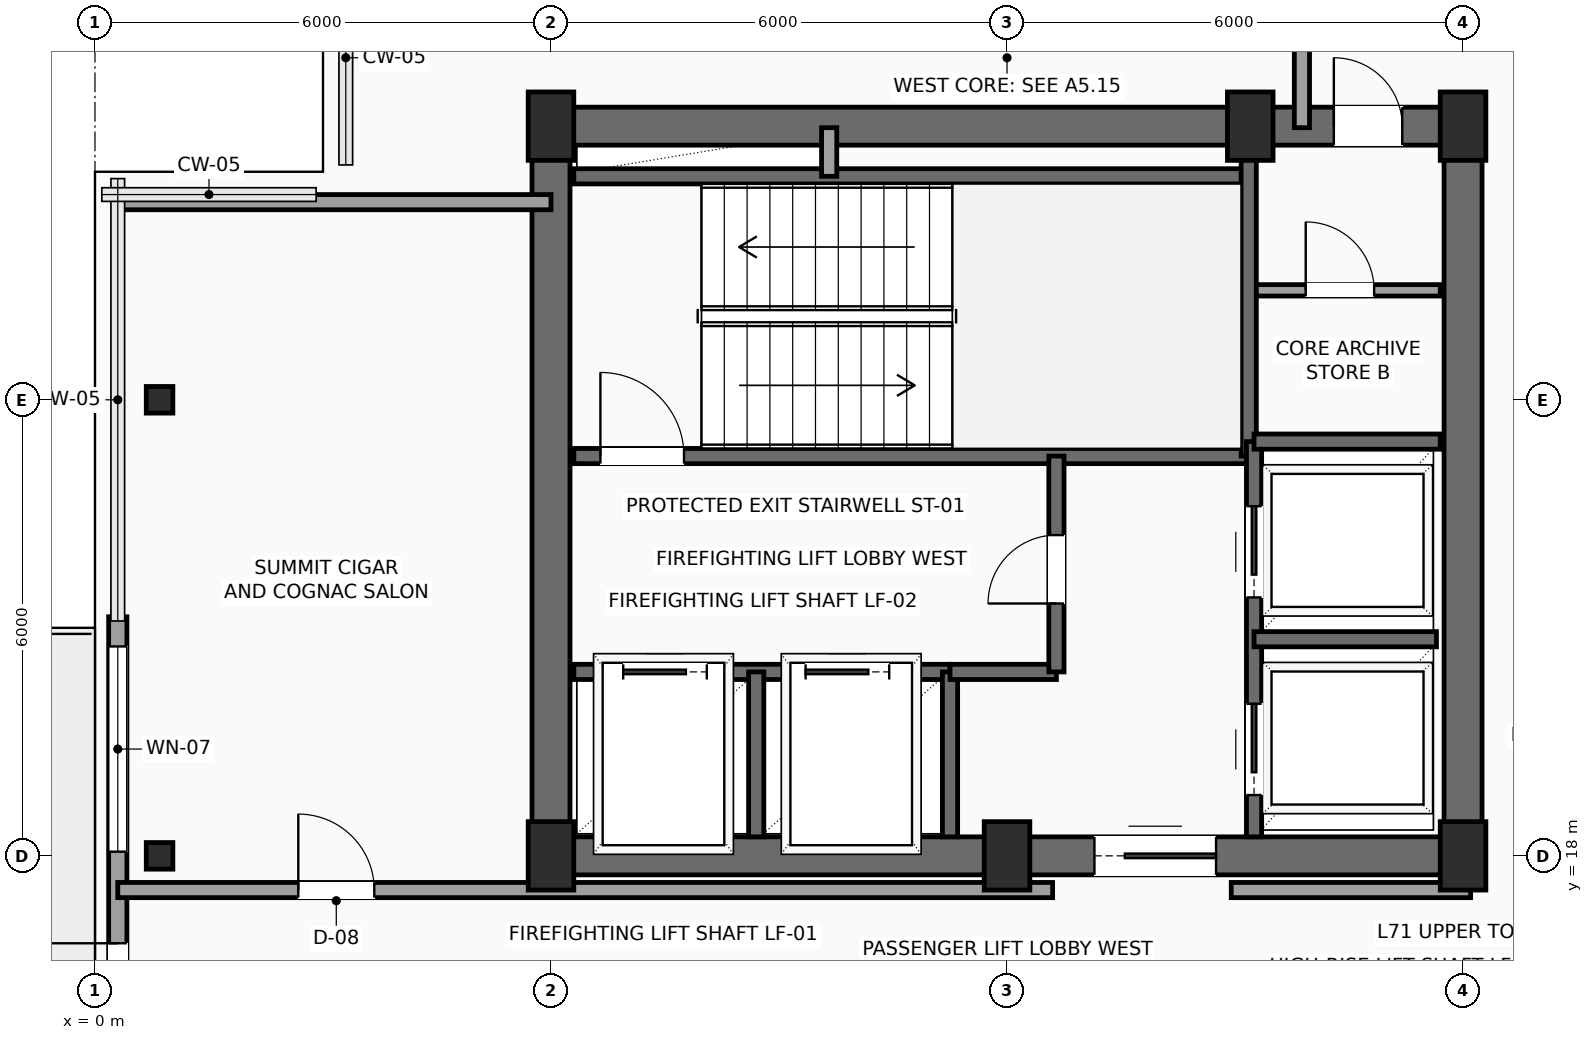
"""IFC4 building model, lengths in metres.
Left out: names, types, materials, properties, quantities, classifications, styles, units other than length and angle.
Written with IfcOpenShell. Run it as: python <this file> out.ifc"""

import sys

from ifc_helpers import new_model, si_unit, direction, frame, frame_2d, origin, origin_2d, place, context, subcontext, project, spatial, rectangle, hollow_rectangle, extrude, element, fill, save


model = new_model("IFC4")
c1 = context("Model", 3, precision=1e-05, world=origin(), true_north=direction((0.0, 1.0)))
c2 = subcontext(c1, "Body", "Model", "MODEL_VIEW")
j1 = project(units=[si_unit("LENGTHUNIT", "METRE"), si_unit("PLANEANGLEUNIT", "RADIAN")], contexts=[c1])
p1 = place(None, origin())
s1 = spatial("IfcSite", under=j1, at=p1, CompositionType="ELEMENT")
p2 = place(p1, origin())
s2 = spatial("IfcBuilding", under=s1, at=p2, CompositionType="ELEMENT")
p3 = place(p2, frame((0.0, 0.0, 281.7)))
s3 = spatial("IfcBuildingStorey", under=s2, at=p3, CompositionType="ELEMENT", Elevation=281.7)
for number, where, z_axis, x_axis in (
    (1, (6.0, 18.0, 0.0), (0.0, 0.0, 1.0), (1.0, 0.0, 0.0)),
    (2, (12.0, 18.0, 0.0), (0.0, 0.0, 1.0), (1.0, 0.0, 0.0)),
    (3, (18.0, 18.0, 0.0), (0.0, 0.0, 1.0), (1.0, 0.0, 0.0)),
    (4, (6.0, 27.6, 0.0), (0.0, 0.0, 1.0), (1.0, 0.0, 0.0)),
    (5, (15.2, 27.6, 0.0), (0.0, 0.0, 1.0), (1.0, 0.0, 0.0)),
    (6, (18.0, 27.6, 0.0), (0.0, 0.0, 1.0), (1.0, 0.0, 0.0)),
):
    element("IfcColumn", number, at=place(p3, frame(where, z_axis=z_axis, x_axis=x_axis)), inside=s3, PredefinedType="COLUMN", context=c2, shape_type="SweptSolid", body=[
        extrude(rectangle(XDim=0.6, YDim=0.9, at=origin_2d()), origin(), (0.0, 0.0, 1.0), 3.5),
    ])
for number, where, z_axis, x_axis in (
    (7, (0.85, 18.0, 0.0), (0.0, 0.0, 1.0), (1.0, 0.0, 0.0)),
    (8, (0.85, 24.0, 0.0), (0.0, 0.0, 1.0), (1.0, 0.0, 0.0)),
):
    element("IfcColumn", number, at=place(p3, frame(where, z_axis=z_axis, x_axis=x_axis)), inside=s3, PredefinedType="COLUMN", context=c2, shape_type="SweptSolid", body=[
        extrude(hollow_rectangle(XDim=0.35, YDim=0.35, WallThickness=0.016, InnerFilletRadius=0.016, OuterFilletRadius=0.032, at=origin_2d()), origin(), (0.0, 0.0, 1.0), 3.5),
    ])
p4 = place(p3, frame((0.3, 11.855, 0.0), z_axis=(0.0, 0.0, 1.0), x_axis=(0.0, 1.0, 0.0)))
e9 = element("IfcWall", 9, at=p4, inside=s3, PredefinedType="SOLIDWALL", context=c2, shape_type="SweptSolid", body=[
    extrude(rectangle(XDim=9.29, YDim=0.24, at=frame_2d((4.645, 0.0))), origin(), (0.0, 0.0, 1.0), 3.3),
])
p5 = place(p4, frame((3.945, 0.0, 0.0)))
e10 = element("IfcOpeningElement", 10, at=p5, cuts=e9, PredefinedType="OPENING", context=c2, shape_type="SweptSolid", body=[
    extrude(rectangle(XDim=1.05, YDim=2.2, at=frame_2d((0.525, 1.1))), frame((0.0, 0.13, 0.0), z_axis=(0.0, -1.0, 0.0), x_axis=(1.0, 0.0, 0.0)), (0.0, 0.0, 1.0), 0.26),
])
p6 = place(p4, frame((6.2, 0.0, 0.6)))
e11 = element("IfcOpeningElement", 11, at=p6, cuts=e9, PredefinedType="OPENING", context=c2, shape_type="SweptSolid", body=[
    extrude(rectangle(XDim=2.7, YDim=2.3, at=frame_2d((1.35, 1.15))), frame((0.0, 0.13, 0.0), z_axis=(0.0, -1.0, 0.0), x_axis=(1.0, 0.0, 0.0)), (0.0, 0.0, 1.0), 0.26),
])
p7 = place(p4, frame((0.8, 0.0, 0.6)))
e12 = element("IfcOpeningElement", 12, at=p7, cuts=e9, PredefinedType="OPENING", context=c2, shape_type="SweptSolid", body=[
    extrude(rectangle(XDim=0.9, YDim=2.2, at=frame_2d((0.45, 1.1))), frame((0.0, 0.13, 0.0), z_axis=(0.0, -1.0, 0.0), x_axis=(1.0, 0.0, 0.0)), (0.0, 0.0, 1.0), 0.26),
])
p8 = place(p3, frame((6.0, 18.0, 0.0), z_axis=(0.0, 0.0, 1.0), x_axis=(1.0, 0.0, 0.0)))
e13 = element("IfcWall", 13, at=p8, inside=s3, PredefinedType="SHEAR", context=c2, shape_type="SweptSolid", body=[
    extrude(rectangle(XDim=12.0, YDim=0.5, at=frame_2d((6.0, 0.0))), origin(), (0.0, 0.0, 1.0), 3.3),
])
p9 = place(p8, frame((7.15, 0.0, 0.0)))
e14 = element("IfcOpeningElement", 14, at=p9, cuts=e13, PredefinedType="OPENING", context=c2, shape_type="SweptSolid", body=[
    extrude(rectangle(XDim=1.6, YDim=2.3, at=frame_2d((0.8, 1.15))), frame((0.0, 0.26, 0.0), z_axis=(0.0, -1.0, 0.0), x_axis=(1.0, 0.0, 0.0)), (0.0, 0.0, 1.0), 0.52),
])
p10 = place(p3, frame((6.0, 27.6, 0.0), z_axis=(0.0, 0.0, 1.0), x_axis=(1.0, 0.0, 0.0)))
e15 = element("IfcWall", 15, at=p10, inside=s3, PredefinedType="SHEAR", context=c2, shape_type="SweptSolid", body=[
    extrude(rectangle(XDim=12.0, YDim=0.5, at=frame_2d((6.0, 0.0))), origin(), (0.0, 0.0, 1.0), 3.3),
])
p11 = place(p10, frame((10.3, 0.0, 0.0)))
e16 = element("IfcOpeningElement", 16, at=p11, cuts=e15, PredefinedType="OPENING", context=c2, shape_type="SweptSolid", body=[
    extrude(rectangle(XDim=0.9, YDim=2.15, at=frame_2d((0.45, 1.075))), frame((0.0, 0.26, 0.0), z_axis=(0.0, -1.0, 0.0), x_axis=(1.0, 0.0, 0.0)), (0.0, 0.0, 1.0), 0.52),
])
for number, where, z_axis, x_axis in (
    (17, (6.0, 18.0, 0.0), (0.0, 0.0, 1.0), (0.0, 1.0, 0.0)),
    (18, (18.0, 18.0, 0.0), (0.0, 0.0, 1.0), (0.0, 1.0, 0.0)),
):
    element("IfcWall", number, at=place(p3, frame(where, z_axis=z_axis, x_axis=x_axis)), inside=s3, PredefinedType="SHEAR", context=c2, shape_type="SweptSolid", body=[
        extrude(rectangle(XDim=9.6, YDim=0.5, at=frame_2d((4.8, 0.0))), origin(), (0.0, 0.0, 1.0), 3.3),
    ])
p12 = place(p3, frame((6.3, 23.26, 0.0), z_axis=(0.0, 0.0, 1.0), x_axis=(1.0, 0.0, 0.0)))
e19 = element("IfcWall", 19, at=p12, inside=s3, PredefinedType="SHEAR", context=c2, shape_type="SweptSolid", body=[
    extrude(rectangle(XDim=8.88, YDim=0.2, at=frame_2d((4.44, 0.0))), origin(), (0.0, 0.0, 1.0), 3.3),
])
p13 = place(p12, frame((0.35, 0.0, 0.0)))
e20 = element("IfcOpeningElement", 20, at=p13, cuts=e19, PredefinedType="OPENING", context=c2, shape_type="SweptSolid", body=[
    extrude(rectangle(XDim=1.1, YDim=2.2, at=frame_2d((0.55, 1.1))), frame((0.0, 0.11, 0.0), z_axis=(0.0, -1.0, 0.0), x_axis=(1.0, 0.0, 0.0)), (0.0, 0.0, 1.0), 0.22),
])
p14 = place(p3, frame((6.3, 26.94, 0.0), z_axis=(0.0, 0.0, 1.0), x_axis=(1.0, 0.0, 0.0)))
e21 = element("IfcWall", 21, at=p14, inside=s3, PredefinedType="SHEAR", context=c2, shape_type="SweptSolid", body=[
    extrude(rectangle(XDim=8.88, YDim=0.2, at=frame_2d((4.44, 0.0))), origin(), (0.0, 0.0, 1.0), 3.3),
])
p15 = place(p3, frame((15.18, 23.26, 0.0), z_axis=(0.0, 0.0, 1.0), x_axis=(0.0, 1.0, 0.0)))
e22 = element("IfcWall", 22, at=p15, inside=s3, PredefinedType="SHEAR", context=c2, shape_type="SweptSolid", body=[
    extrude(rectangle(XDim=4.04, YDim=0.2, at=frame_2d((2.02, 0.0))), origin(), (0.0, 0.0, 1.0), 3.3),
])
p16 = place(p3, frame((6.3, 20.42, 0.0), z_axis=(0.0, 0.0, 1.0), x_axis=(1.0, 0.0, 0.0)))
e23 = element("IfcWall", 23, at=p16, inside=s3, PredefinedType="SHEAR", context=c2, shape_type="SweptSolid", body=[
    extrude(rectangle(XDim=4.95, YDim=0.2, at=frame_2d((2.475, 0.0))), origin(), (0.0, 0.0, 1.0), 3.3),
])
p17 = place(p16, frame((0.65, 0.0, 0.0)))
e24 = element("IfcOpeningElement", 24, at=p17, cuts=e23, PredefinedType="OPENING", context=c2, shape_type="SweptSolid", body=[
    extrude(rectangle(XDim=1.1, YDim=2.2, at=frame_2d((0.55, 1.1))), frame((0.0, 0.11, 0.0), z_axis=(0.0, -1.0, 0.0), x_axis=(1.0, 0.0, 0.0)), (0.0, 0.0, 1.0), 0.22),
])
p18 = place(p16, frame((3.05, 0.0, 0.0)))
e25 = element("IfcOpeningElement", 25, at=p18, cuts=e23, PredefinedType="OPENING", context=c2, shape_type="SweptSolid", body=[
    extrude(rectangle(XDim=1.1, YDim=2.2, at=frame_2d((0.55, 1.1))), frame((0.0, 0.11, 0.0), z_axis=(0.0, -1.0, 0.0), x_axis=(1.0, 0.0, 0.0)), (0.0, 0.0, 1.0), 0.22),
])
for number, where, z_axis, x_axis in (
    (26, (8.7, 18.25, 0.0), (0.0, 0.0, 1.0), (0.0, 1.0, 0.0)),
    (27, (11.25, 18.25, 0.0), (0.0, 0.0, 1.0), (0.0, 1.0, 0.0)),
):
    element("IfcWall", number, at=place(p3, frame(where, z_axis=z_axis, x_axis=x_axis)), inside=s3, PredefinedType="SHEAR", context=c2, shape_type="SweptSolid", body=[
        extrude(rectangle(XDim=2.17, YDim=0.2, at=frame_2d((1.085, 0.0))), origin(), (0.0, 0.0, 1.0), 3.3),
    ])
p19 = place(p3, frame((11.25, 20.42, 0.0), z_axis=(0.0, 0.0, 1.0), x_axis=(1.0, 0.0, 0.0)))
e28 = element("IfcWall", 28, at=p19, inside=s3, PredefinedType="SHEAR", context=c2, shape_type="SweptSolid", body=[
    extrude(rectangle(XDim=1.4, YDim=0.2, at=frame_2d((0.7, 0.0))), origin(), (0.0, 0.0, 1.0), 3.3),
])
p20 = place(p3, frame((12.65, 20.42, 0.0), z_axis=(0.0, 0.0, 1.0), x_axis=(0.0, 1.0, 0.0)))
e29 = element("IfcWall", 29, at=p20, inside=s3, PredefinedType="SHEAR", context=c2, shape_type="SweptSolid", body=[
    extrude(rectangle(XDim=2.84, YDim=0.2, at=frame_2d((1.42, 0.0))), origin(), (0.0, 0.0, 1.0), 3.3),
])
p21 = place(p20, frame((0.9, 0.0, 0.0)))
e30 = element("IfcOpeningElement", 30, at=p21, cuts=e29, PredefinedType="OPENING", context=c2, shape_type="SweptSolid", body=[
    extrude(rectangle(XDim=0.9, YDim=2.15, at=frame_2d((0.45, 1.075))), frame((0.0, 0.11, 0.0), z_axis=(0.0, -1.0, 0.0), x_axis=(1.0, 0.0, 0.0)), (0.0, 0.0, 1.0), 0.22),
])
p22 = place(p3, frame((9.66, 26.94, 0.0), z_axis=(0.0, 0.0, 1.0), x_axis=(0.0, 1.0, 0.0)))
e31 = element("IfcWall", 31, at=p22, inside=s3, PredefinedType="SOLIDWALL", context=c2, shape_type="SweptSolid", body=[
    extrude(rectangle(XDim=0.64, YDim=0.2, at=frame_2d((0.32, 0.0))), origin(), (0.0, 0.0, 1.0), 3.3),
])
p23 = place(p3, frame((15.25, 18.25, 0.0), z_axis=(0.0, 0.0, 1.0), x_axis=(0.0, 1.0, 0.0)))
e32 = element("IfcWall", 32, at=p23, inside=s3, PredefinedType="SHEAR", context=c2, shape_type="SweptSolid", body=[
    extrude(rectangle(XDim=5.2, YDim=0.2, at=frame_2d((2.6, 0.0))), origin(), (0.0, 0.0, 1.0), 3.3),
])
p24 = place(p23, frame((0.55, 0.0, 0.0)))
e33 = element("IfcOpeningElement", 33, at=p24, cuts=e32, PredefinedType="OPENING", context=c2, shape_type="SweptSolid", body=[
    extrude(rectangle(XDim=1.2, YDim=2.2, at=frame_2d((0.6, 1.1))), frame((0.0, 0.11, 0.0), z_axis=(0.0, -1.0, 0.0), x_axis=(1.0, 0.0, 0.0)), (0.0, 0.0, 1.0), 0.22),
])
p25 = place(p23, frame((3.15, 0.0, 0.0)))
e34 = element("IfcOpeningElement", 34, at=p25, cuts=e32, PredefinedType="OPENING", context=c2, shape_type="SweptSolid", body=[
    extrude(rectangle(XDim=1.2, YDim=2.2, at=frame_2d((0.6, 1.1))), frame((0.0, 0.11, 0.0), z_axis=(0.0, -1.0, 0.0), x_axis=(1.0, 0.0, 0.0)), (0.0, 0.0, 1.0), 0.22),
])
p26 = place(p3, frame((15.25, 20.85, 0.0), z_axis=(0.0, 0.0, 1.0), x_axis=(1.0, 0.0, 0.0)))
e35 = element("IfcWall", 35, at=p26, inside=s3, PredefinedType="SHEAR", context=c2, shape_type="SweptSolid", body=[
    extrude(rectangle(XDim=2.4, YDim=0.2, at=frame_2d((1.2, 0.0))), origin(), (0.0, 0.0, 1.0), 3.3),
])
p27 = place(p3, frame((15.25, 23.45, 0.0), z_axis=(0.0, 0.0, 1.0), x_axis=(1.0, 0.0, 0.0)))
e36 = element("IfcWall", 36, at=p27, inside=s3, PredefinedType="SHEAR", context=c2, shape_type="SweptSolid", body=[
    extrude(rectangle(XDim=2.45, YDim=0.2, at=frame_2d((1.225, 0.0))), origin(), (0.0, 0.0, 1.0), 3.3),
])
p28 = place(p3, frame((15.28, 25.44, 0.0), z_axis=(0.0, 0.0, 1.0), x_axis=(1.0, 0.0, 0.0)))
e37 = element("IfcWall", 37, at=p28, inside=s3, PredefinedType="PARTITIONING", context=c2, shape_type="SweptSolid", body=[
    extrude(rectangle(XDim=2.42, YDim=0.15, at=frame_2d((1.21, 0.0))), origin(), (0.0, 0.0, 1.0), 3.3),
])
p29 = place(p28, frame((0.65, 0.0, 0.0)))
e38 = element("IfcOpeningElement", 38, at=p29, cuts=e37, PredefinedType="OPENING", context=c2, shape_type="SweptSolid", body=[
    extrude(rectangle(XDim=0.9, YDim=2.15, at=frame_2d((0.45, 1.075))), frame((0.0, 0.085, 0.0), z_axis=(0.0, -1.0, 0.0), x_axis=(1.0, 0.0, 0.0)), (0.0, 0.0, 1.0), 0.17),
])
p30 = place(p3, frame((0.3, 17.55, 0.0), z_axis=(0.0, 0.0, 1.0), x_axis=(1.0, 0.0, 0.0)))
e39 = element("IfcWall", 39, at=p30, inside=s3, PredefinedType="SOLIDWALL", context=c2, shape_type="SweptSolid", body=[
    extrude(rectangle(XDim=12.3, YDim=0.2, at=frame_2d((6.15, 0.0))), origin(), (0.0, 0.0, 1.0), 3.3),
])
p31 = place(p30, frame((2.375, 0.0, 0.0)))
e40 = element("IfcOpeningElement", 40, at=p31, cuts=e39, PredefinedType="OPENING", context=c2, shape_type="SweptSolid", body=[
    extrude(rectangle(XDim=1.0, YDim=2.2, at=frame_2d((0.5, 1.1))), frame((0.0, 0.11, 0.0), z_axis=(0.0, -1.0, 0.0), x_axis=(1.0, 0.0, 0.0)), (0.0, 0.0, 1.0), 0.22),
])
p32 = place(p3, frame((14.95, 17.55, 0.0), z_axis=(0.0, 0.0, 1.0), x_axis=(1.0, 0.0, 0.0)))
e41 = element("IfcWall", 41, at=p32, inside=s3, PredefinedType="SOLIDWALL", context=c2, shape_type="SweptSolid", body=[
    extrude(rectangle(XDim=3.15, YDim=0.2, at=frame_2d((1.575, 0.0))), origin(), (0.0, 0.0, 1.0), 3.3),
])
p33 = place(p3, frame((15.88, 27.58, 0.0), z_axis=(0.0, 0.0, 1.0), x_axis=(0.0, 1.0, 0.0)))
e42 = element("IfcWall", 42, at=p33, inside=s3, PredefinedType="SOLIDWALL", context=c2, shape_type="SweptSolid", body=[
    extrude(rectangle(XDim=2.12, YDim=0.2, at=frame_2d((1.06, 0.0))), origin(), (0.0, 0.0, 1.0), 3.3),
])
p34 = place(p3, frame((0.3, 26.6, 0.0), z_axis=(0.0, 0.0, 1.0), x_axis=(1.0, 0.0, 0.0)))
e43 = element("IfcWall", 43, at=p34, inside=s3, PredefinedType="PARTITIONING", context=c2, shape_type="SweptSolid", body=[
    extrude(rectangle(XDim=5.7, YDim=0.2, at=frame_2d((2.85, 0.0))), origin(), (0.0, 0.0, 1.0), 3.3),
])
p35 = place(p5, origin())
e44 = element("IfcDoor", 44, at=p35, inside=s3, OperationType="SINGLE_SWING_RIGHT", PredefinedType="DOOR", context=c2, shape_type="SweptSolid", body=[
    extrude(rectangle(XDim=1.05, YDim=2.2, at=frame_2d((0.525, 1.1))), frame((0.0, 0.025, 0.0), z_axis=(0.0, -1.0, 0.0), x_axis=(1.0, 0.0, 0.0)), (0.0, 0.0, 1.0), 0.05),
])
fill(e10, e44)
p36 = place(p6, origin())
e45 = element("IfcWindow", 45, at=p36, inside=s3, PartitioningType="SINGLE_PANEL", PredefinedType="WINDOW", context=c2, shape_type="SweptSolid", body=[
    extrude(rectangle(XDim=2.7, YDim=2.3, at=frame_2d((1.35, 1.15))), frame((0.0, 0.03, 0.0), z_axis=(0.0, -1.0, 0.0), x_axis=(1.0, 0.0, 0.0)), (0.0, 0.0, 1.0), 0.06),
])
fill(e11, e45)
p37 = place(p9, origin())
e46 = element("IfcDoor", 46, at=p37, inside=s3, OperationType="DOUBLE_DOOR_SLIDING", PredefinedType="DOOR", context=c2, shape_type="SweptSolid", body=[
    extrude(rectangle(XDim=1.6, YDim=2.3, at=frame_2d((0.8, 1.15))), frame((0.0, 0.025, 0.0), z_axis=(0.0, -1.0, 0.0), x_axis=(1.0, 0.0, 0.0)), (0.0, 0.0, 1.0), 0.05),
])
fill(e14, e46)
p38 = place(p11, origin())
e47 = element("IfcDoor", 47, at=p38, inside=s3, OperationType="SINGLE_SWING_LEFT", PredefinedType="DOOR", context=c2, shape_type="SweptSolid", body=[
    extrude(rectangle(XDim=0.9, YDim=2.15, at=frame_2d((0.45, 1.075))), frame((0.0, 0.025, 0.0), z_axis=(0.0, -1.0, 0.0), x_axis=(1.0, 0.0, 0.0)), (0.0, 0.0, 1.0), 0.05),
])
fill(e16, e47)
p39 = place(p13, origin())
e48 = element("IfcDoor", 48, at=p39, inside=s3, OperationType="SINGLE_SWING_LEFT", PredefinedType="DOOR", context=c2, shape_type="SweptSolid", body=[
    extrude(rectangle(XDim=1.1, YDim=2.2, at=frame_2d((0.55, 1.1))), frame((0.0, 0.025, 0.0), z_axis=(0.0, -1.0, 0.0), x_axis=(1.0, 0.0, 0.0)), (0.0, 0.0, 1.0), 0.05),
])
fill(e20, e48)
p40 = place(p17, origin())
e49 = element("IfcDoor", 49, at=p40, inside=s3, OperationType="SLIDING_TO_LEFT", PredefinedType="DOOR", context=c2, shape_type="SweptSolid", body=[
    extrude(rectangle(XDim=1.1, YDim=2.2, at=frame_2d((0.55, 1.1))), frame((0.0, 0.025, 0.0), z_axis=(0.0, -1.0, 0.0), x_axis=(1.0, 0.0, 0.0)), (0.0, 0.0, 1.0), 0.05),
])
fill(e24, e49)
p41 = place(p18, origin())
e50 = element("IfcDoor", 50, at=p41, inside=s3, OperationType="SLIDING_TO_LEFT", PredefinedType="DOOR", context=c2, shape_type="SweptSolid", body=[
    extrude(rectangle(XDim=1.1, YDim=2.2, at=frame_2d((0.55, 1.1))), frame((0.0, 0.025, 0.0), z_axis=(0.0, -1.0, 0.0), x_axis=(1.0, 0.0, 0.0)), (0.0, 0.0, 1.0), 0.05),
])
fill(e25, e50)
p42 = place(p21, origin())
e51 = element("IfcDoor", 51, at=p42, inside=s3, OperationType="SINGLE_SWING_LEFT", PredefinedType="DOOR", context=c2, shape_type="SweptSolid", body=[
    extrude(rectangle(XDim=0.9, YDim=2.15, at=frame_2d((0.45, 1.075))), frame((0.0, 0.025, 0.0), z_axis=(0.0, -1.0, 0.0), x_axis=(1.0, 0.0, 0.0)), (0.0, 0.0, 1.0), 0.05),
])
fill(e30, e51)
p43 = place(p24, origin())
e52 = element("IfcDoor", 52, at=p43, inside=s3, OperationType="SLIDING_TO_RIGHT", PredefinedType="DOOR", context=c2, shape_type="SweptSolid", body=[
    extrude(rectangle(XDim=1.2, YDim=2.2, at=frame_2d((0.6, 1.1))), frame((0.0, 0.025, 0.0), z_axis=(0.0, -1.0, 0.0), x_axis=(1.0, 0.0, 0.0)), (0.0, 0.0, 1.0), 0.05),
])
fill(e33, e52)
p44 = place(p25, origin())
e53 = element("IfcDoor", 53, at=p44, inside=s3, OperationType="SLIDING_TO_RIGHT", PredefinedType="DOOR", context=c2, shape_type="SweptSolid", body=[
    extrude(rectangle(XDim=1.2, YDim=2.2, at=frame_2d((0.6, 1.1))), frame((0.0, 0.025, 0.0), z_axis=(0.0, -1.0, 0.0), x_axis=(1.0, 0.0, 0.0)), (0.0, 0.0, 1.0), 0.05),
])
fill(e34, e53)
p45 = place(p29, origin())
e54 = element("IfcDoor", 54, at=p45, inside=s3, OperationType="SINGLE_SWING_LEFT", PredefinedType="DOOR", context=c2, shape_type="SweptSolid", body=[
    extrude(rectangle(XDim=0.9, YDim=2.15, at=frame_2d((0.45, 1.075))), frame((0.0, 0.025, 0.0), z_axis=(0.0, -1.0, 0.0), x_axis=(1.0, 0.0, 0.0)), (0.0, 0.0, 1.0), 0.05),
])
fill(e38, e54)
p46 = place(p31, origin())
e55 = element("IfcDoor", 55, at=p46, inside=s3, OperationType="SINGLE_SWING_LEFT", PredefinedType="DOOR", context=c2, shape_type="SweptSolid", body=[
    extrude(rectangle(XDim=1.0, YDim=2.2, at=frame_2d((0.5, 1.1))), frame((0.0, 0.025, 0.0), z_axis=(0.0, -1.0, 0.0), x_axis=(1.0, 0.0, 0.0)), (0.0, 0.0, 1.0), 0.05),
])
fill(e40, e55)
save(model, sys.argv[1])
